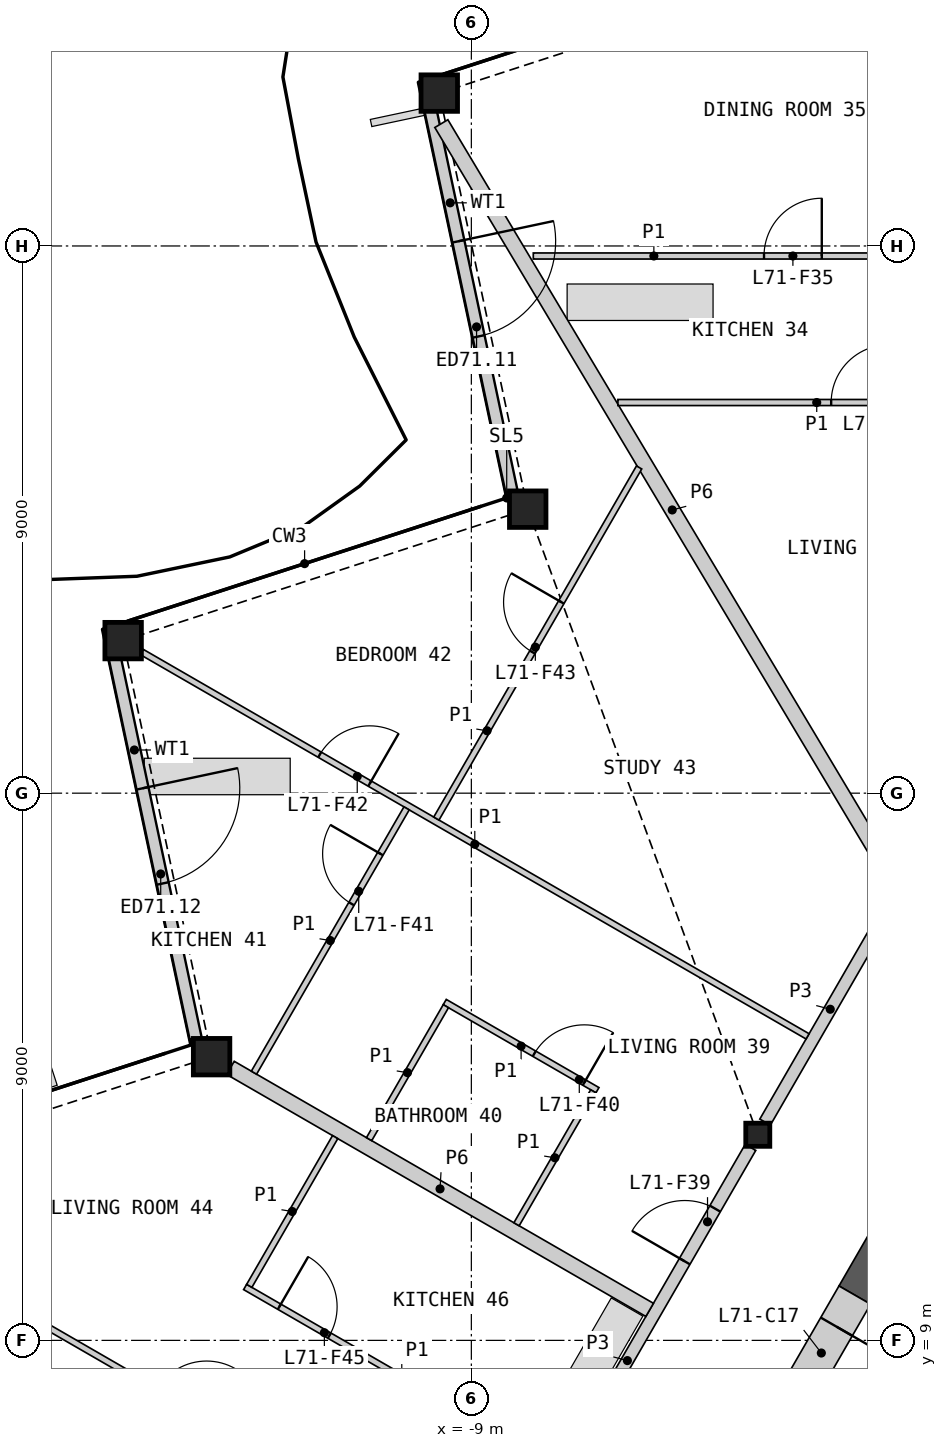
"""IFC4 building model, lengths in metres.
Left out: names, types, materials, properties, quantities, classifications, styles, units other than length and angle.
Written with IfcOpenShell. Run it as: python <this file> out.ifc"""

import sys

from ifc_helpers import new_model, si_unit, direction, frame, frame_2d, origin, origin_2d, place, context, subcontext, project, spatial, rectangle, hollow_rectangle, i_section, extrude, element, fill, save


model = new_model("IFC4")
c1 = context("Model", 3, precision=1e-05, world=origin(), true_north=direction((0.0, 1.0)))
c2 = subcontext(c1, "Body", "Model", "MODEL_VIEW")
j1 = project(units=[si_unit("LENGTHUNIT", "METRE"), si_unit("PLANEANGLEUNIT", "RADIAN")], contexts=[c1])
p1 = place(None, origin())
s1 = spatial("IfcSite", under=j1, at=p1, CompositionType="ELEMENT")
p2 = place(p1, origin())
s2 = spatial("IfcBuilding", under=s1, at=p2, CompositionType="ELEMENT")
p3 = place(p2, frame((0.0, 0.0, 322.2)))
s3 = spatial("IfcBuildingStorey", under=s2, at=p3, CompositionType="ELEMENT", Elevation=322.2)
for number, where, z_axis, x_axis in (
    (1, (-9.527, 29.514, 0.0), (0.0, 0.0, 1.0), (1.0, 0.0, 0.0)),
    (2, (-8.073, 22.671, 0.0), (0.0, 0.0, 1.0), (1.0, 0.0, 0.0)),
    (3, (-14.727, 20.509, 0.0), (0.0, 0.0, 1.0), (1.0, 0.0, 0.0)),
    (4, (-13.272, 13.666, 0.0), (0.0, 0.0, 1.0), (1.0, 0.0, 0.0)),
):
    element("IfcColumn", number, at=place(p3, frame(where, z_axis=z_axis, x_axis=x_axis)), inside=s3, PredefinedType="COLUMN", context=c2, shape_type="SweptSolid", body=[
        extrude(hollow_rectangle(XDim=0.6, YDim=0.6, WallThickness=0.04, at=origin_2d()), origin(), (0.0, 0.0, 1.0), 3.4),
    ])
p4 = place(p3, frame((-4.289, 12.382, 0.0), z_axis=(0.0, 0.0, 1.0), x_axis=(1.0, 0.0, 0.0)))
e5 = element("IfcColumn", 5, at=p4, inside=s3, PredefinedType="COLUMN", context=c2, shape_type="SweptSolid", body=[
    extrude(i_section(OverallWidth=0.396, OverallDepth=0.381, WebThickness=0.019, FlangeThickness=0.03, at=origin_2d()), origin(), (0.0, 0.0, 1.0), 3.4),
])
p5 = place(p3, frame((-9.684, 29.289, 0.0), z_axis=(0.0, 0.0, 1.0), x_axis=(0.207920686021, -0.978145688701, 0.0)))
e6 = element("IfcWall", 6, at=p5, inside=s3, PredefinedType="SOLIDWALL", context=c2, shape_type="SweptSolid", body=[
    extrude(rectangle(XDim=6.459, YDim=0.2, at=frame_2d((3.229, 0.0))), origin(), (0.0, 0.0, 1.0), 2.488),
])
p6 = place(p5, frame((2.261, 0.0, 0.0)))
e7 = element("IfcOpeningElement", 7, at=p6, cuts=e6, PredefinedType="OPENING", context=c2, shape_type="SweptSolid", body=[
    extrude(rectangle(XDim=1.6, YDim=2.25, at=frame_2d((0.8, 1.125))), frame((0.0, 0.11, 0.0), z_axis=(0.0, -1.0, 0.0), x_axis=(1.0, 0.0, 0.0)), (0.0, 0.0, 1.0), 0.22),
])
p7 = place(p3, frame((-14.878, 20.292, 0.0), z_axis=(0.0, 0.0, 1.0), x_axis=(0.207943189785, -0.978140904892, 0.0)))
e8 = element("IfcWall", 8, at=p7, inside=s3, PredefinedType="SOLIDWALL", context=c2, shape_type="SweptSolid", body=[
    extrude(rectangle(XDim=6.467, YDim=0.2, at=frame_2d((3.233, 0.0))), origin(), (0.0, 0.0, 1.0), 2.488),
])
p8 = place(p7, frame((2.261, 0.0, 0.0)))
e9 = element("IfcOpeningElement", 9, at=p8, cuts=e8, PredefinedType="OPENING", context=c2, shape_type="SweptSolid", body=[
    extrude(rectangle(XDim=1.6, YDim=2.25, at=frame_2d((0.8, 1.125))), frame((0.0, 0.11, 0.0), z_axis=(0.0, -1.0, 0.0), x_axis=(1.0, 0.0, 0.0)), (0.0, 0.0, 1.0), 0.22),
])
p9 = place(p3, frame((-0.26, 13.961, 0.0), z_axis=(0.0, 0.0, 1.0), x_axis=(-0.50000604952, -0.866021911064, 0.0)))
e10 = element("IfcWall", 10, at=p9, inside=s3, PredefinedType="SHEAR", context=c2, shape_type="SweptSolid", body=[
    extrude(rectangle(XDim=4.869, YDim=0.6, at=frame_2d((2.434, 0.0))), origin(), (0.0, 0.0, 1.0), 3.1),
])
p10 = place(p3, frame((-2.694, 9.745, 0.0), z_axis=(0.0, 0.0, 1.0), x_axis=(-0.50002983664, -0.866008176907, 0.0)))
e11 = element("IfcWall", 11, at=p10, inside=s3, PredefinedType="SHEAR", context=c2, shape_type="SweptSolid", body=[
    extrude(rectangle(XDim=2.2, YDim=0.6, at=frame_2d((1.1, 0.0))), origin(), (0.0, 0.0, 1.0), 3.1),
])
p11 = place(p10, frame((0.6, 0.0, 0.0)))
e12 = element("IfcOpeningElement", 12, at=p11, cuts=e11, PredefinedType="OPENING", context=c2, shape_type="SweptSolid", body=[
    extrude(rectangle(XDim=1.0, YDim=2.1, at=frame_2d((0.5, 1.05))), frame((0.0, 0.31, 0.0), z_axis=(0.0, -1.0, 0.0), x_axis=(1.0, 0.0, 0.0)), (0.0, 0.0, 1.0), 0.62),
])
p12 = place(p3, frame((-9.493, 29.012, 0.0), z_axis=(0.0, 0.0, 1.0), x_axis=(0.512967150926, -0.85840823742, 0.0)))
e13 = element("IfcWall", 13, at=p12, inside=s3, PredefinedType="PARTITIONING", context=c2, shape_type="SweptSolid", body=[
    extrude(rectangle(XDim=14.805, YDim=0.25, at=frame_2d((7.402, 0.0))), origin(), (0.0, 0.0, 1.0), 2.33),
])
p13 = place(p3, frame((-8.458, 5.16, 0.0), z_axis=(0.0, 0.0, 1.0), x_axis=(0.499984266882, 0.866034487114, 0.0)))
e14 = element("IfcWall", 14, at=p13, inside=s3, PredefinedType="PARTITIONING", context=c2, shape_type="SweptSolid", body=[
    extrude(rectangle(XDim=8.099, YDim=0.2, at=frame_2d((4.049, 0.0))), origin(), (0.0, 0.0, 1.0), 3.1),
])
p14 = place(p13, frame((5.935, 0.0, 0.0)))
e15 = element("IfcOpeningElement", 15, at=p14, cuts=e14, PredefinedType="OPENING", context=c2, shape_type="SweptSolid", body=[
    extrude(rectangle(XDim=1.0, YDim=2.1, at=frame_2d((0.5, 1.05))), frame((0.0, 0.11, 0.0), z_axis=(0.0, -1.0, 0.0), x_axis=(1.0, 0.0, 0.0)), (0.0, 0.0, 1.0), 0.22),
])
p15 = place(p13, frame((0.83, 0.0, 0.0)))
e16 = element("IfcOpeningElement", 16, at=p15, cuts=e14, PredefinedType="OPENING", context=c2, shape_type="SweptSolid", body=[
    extrude(rectangle(XDim=1.0, YDim=2.1, at=frame_2d((0.5, 1.05))), frame((0.0, 0.11, 0.0), z_axis=(0.0, -1.0, 0.0), x_axis=(1.0, 0.0, 0.0)), (0.0, 0.0, 1.0), 0.22),
])
p16 = place(p3, frame((-12.962, 13.482, 0.0), z_axis=(0.0, 0.0, 1.0), x_axis=(0.866022671543, -0.50000473235, 0.0)))
e17 = element("IfcWall", 17, at=p16, inside=s3, PredefinedType="PARTITIONING", context=c2, shape_type="SweptSolid", body=[
    extrude(rectangle(XDim=7.961, YDim=0.25, at=frame_2d((3.98, 0.0))), origin(), (0.0, 0.0, 1.0), 2.33),
])
p17 = place(p3, frame((-4.169, 12.59, 0.0), z_axis=(0.0, 0.0, 1.0), x_axis=(0.499978750566, 0.866037671803, 0.0)))
e18 = element("IfcWall", 18, at=p17, inside=s3, PredefinedType="PARTITIONING", context=c2, shape_type="SweptSolid", body=[
    extrude(rectangle(XDim=4.288, YDim=0.2, at=frame_2d((2.144, 0.0))), origin(), (0.0, 0.0, 1.0), 3.1),
])
p18 = place(p3, frame((-14.417, 20.32, 0.0), z_axis=(0.0, 0.0, 1.0), x_axis=(0.866021216079, -0.500007253249, 0.0)))
e19 = element("IfcWall", 19, at=p18, inside=s3, PredefinedType="PARTITIONING", context=c2, shape_type="SweptSolid", body=[
    extrude(rectangle(XDim=12.639, YDim=0.1, at=frame_2d((6.32, 0.0))), origin(), (0.0, 0.0, 1.0), 2.33),
])
p19 = place(p18, frame((3.375, 0.0, 0.0)))
e20 = element("IfcOpeningElement", 20, at=p19, cuts=e19, PredefinedType="OPENING", context=c2, shape_type="SweptSolid", body=[
    extrude(rectangle(XDim=0.95, YDim=2.1, at=frame_2d((0.475, 1.05))), frame((0.0, 0.06, 0.0), z_axis=(0.0, -1.0, 0.0), x_axis=(1.0, 0.0, 0.0)), (0.0, 0.0, 1.0), 0.12),
])
p20 = place(p3, frame((-19.615, 11.325, 0.0), z_axis=(0.0, 0.0, 1.0), x_axis=(0.86602139559, -0.500006942333, 0.0)))
e21 = element("IfcWall", 21, at=p20, inside=s3, PredefinedType="PARTITIONING", context=c2, shape_type="SweptSolid", body=[
    extrude(rectangle(XDim=12.505, YDim=0.1, at=frame_2d((6.252, 0.0))), origin(), (0.0, 0.0, 1.0), 2.33),
])
p21 = place(p20, frame((6.28, 0.0, 0.0)))
e22 = element("IfcOpeningElement", 22, at=p21, cuts=e21, PredefinedType="OPENING", context=c2, shape_type="SweptSolid", body=[
    extrude(rectangle(XDim=0.95, YDim=2.1, at=frame_2d((0.475, 1.05))), frame((0.0, 0.06, 0.0), z_axis=(0.0, -1.0, 0.0), x_axis=(1.0, 0.0, 0.0)), (0.0, 0.0, 1.0), 0.12),
])
p22 = place(p3, frame((-7.981, 26.835, 0.0), z_axis=(0.0, 0.0, 1.0), x_axis=(1.0, 0.0, 0.0)))
e23 = element("IfcWall", 23, at=p22, inside=s3, PredefinedType="PARTITIONING", context=c2, shape_type="SweptSolid", body=[
    extrude(rectangle(XDim=7.931, YDim=0.1, at=frame_2d((3.966, 0.0))), origin(), (0.0, 0.0, 1.0), 2.33),
])
p23 = place(p22, frame((3.794, 0.0, 0.0)))
e24 = element("IfcOpeningElement", 24, at=p23, cuts=e23, PredefinedType="OPENING", context=c2, shape_type="SweptSolid", body=[
    extrude(rectangle(XDim=0.95, YDim=2.1, at=frame_2d((0.475, 1.05))), frame((0.0, 0.06, 0.0), z_axis=(0.0, -1.0, 0.0), x_axis=(1.0, 0.0, 0.0)), (0.0, 0.0, 1.0), 0.12),
])
p24 = place(p3, frame((-9.575, 17.583, 0.0), z_axis=(0.0, 0.0, 1.0), x_axis=(0.499998189891, 0.866026448849, 0.0)))
e25 = element("IfcWall", 25, at=p24, inside=s3, PredefinedType="PARTITIONING", context=c2, shape_type="SweptSolid", body=[
    extrude(rectangle(XDim=6.668, YDim=0.1, at=frame_2d((3.334, 0.0))), origin(), (0.0, 0.0, 1.0), 2.33),
])
p25 = place(p24, frame((3.16, 0.0, 0.0)))
e26 = element("IfcOpeningElement", 26, at=p25, cuts=e25, PredefinedType="OPENING", context=c2, shape_type="SweptSolid", body=[
    extrude(rectangle(XDim=0.95, YDim=2.1, at=frame_2d((0.475, 1.05))), frame((0.0, 0.06, 0.0), z_axis=(0.0, -1.0, 0.0), x_axis=(1.0, 0.0, 0.0)), (0.0, 0.0, 1.0), 0.12),
])
p26 = place(p3, frame((-6.59, 24.425, 0.0), z_axis=(0.0, 0.0, 1.0), x_axis=(1.0, 0.0, 0.0)))
e27 = element("IfcWall", 27, at=p26, inside=s3, PredefinedType="PARTITIONING", context=c2, shape_type="SweptSolid", body=[
    extrude(rectangle(XDim=6.54, YDim=0.1, at=frame_2d((3.27, 0.0))), origin(), (0.0, 0.0, 1.0), 2.33),
])
p27 = place(p26, frame((3.508, 0.0, 0.0)))
e28 = element("IfcOpeningElement", 28, at=p27, cuts=e27, PredefinedType="OPENING", context=c2, shape_type="SweptSolid", body=[
    extrude(rectangle(XDim=0.95, YDim=2.1, at=frame_2d((0.475, 1.05))), frame((0.0, 0.06, 0.0), z_axis=(0.0, -1.0, 0.0), x_axis=(1.0, 0.0, 0.0)), (0.0, 0.0, 1.0), 0.12),
])
p28 = place(p3, frame((-12.721, 9.878, 0.0), z_axis=(0.0, 0.0, 1.0), x_axis=(0.866027751316, -0.499995933934, 0.0)))
e29 = element("IfcWall", 29, at=p28, inside=s3, PredefinedType="PARTITIONING", context=c2, shape_type="SweptSolid", body=[
    extrude(rectangle(XDim=5.95, YDim=0.1, at=frame_2d((2.975, 0.0))), origin(), (0.0, 0.0, 1.0), 2.33),
])
p29 = place(p28, frame((0.65, 0.0, 0.0)))
e30 = element("IfcOpeningElement", 30, at=p29, cuts=e29, PredefinedType="OPENING", context=c2, shape_type="SweptSolid", body=[
    extrude(rectangle(XDim=0.95, YDim=2.1, at=frame_2d((0.475, 1.05))), frame((0.0, 0.06, 0.0), z_axis=(0.0, -1.0, 0.0), x_axis=(1.0, 0.0, 0.0)), (0.0, 0.0, 1.0), 0.12),
])
p30 = place(p3, frame((-12.575, 13.403, 0.0), z_axis=(0.0, 0.0, 1.0), x_axis=(0.499989096993, 0.866031698547, 0.0)))
e31 = element("IfcWall", 31, at=p30, inside=s3, PredefinedType="PARTITIONING", context=c2, shape_type="SweptSolid", body=[
    extrude(rectangle(XDim=5.02, YDim=0.1, at=frame_2d((2.51, 0.0))), origin(), (0.0, 0.0, 1.0), 2.33),
])
p31 = place(p30, frame((3.208, 0.0, 0.0)))
e32 = element("IfcOpeningElement", 32, at=p31, cuts=e31, PredefinedType="OPENING", context=c2, shape_type="SweptSolid", body=[
    extrude(rectangle(XDim=0.95, YDim=2.1, at=frame_2d((0.475, 1.05))), frame((0.0, 0.06, 0.0), z_axis=(0.0, -1.0, 0.0), x_axis=(1.0, 0.0, 0.0)), (0.0, 0.0, 1.0), 0.12),
])
p32 = place(p3, frame((-12.652, 9.897, 0.0), z_axis=(0.0, 0.0, 1.0), x_axis=(0.500024172624, 0.866011447264, 0.0)))
e33 = element("IfcWall", 33, at=p32, inside=s3, PredefinedType="PARTITIONING", context=c2, shape_type="SweptSolid", body=[
    extrude(rectangle(XDim=2.825, YDim=0.1, at=frame_2d((1.413, 0.0))), origin(), (0.0, 0.0, 1.0), 2.33),
])
p33 = place(p3, frame((-9.438, 14.565, 0.0), z_axis=(0.0, 0.0, 1.0), x_axis=(0.866032775405, -0.499987231761, 0.0)))
e34 = element("IfcWall", 34, at=p33, inside=s3, PredefinedType="PARTITIONING", context=c2, shape_type="SweptSolid", body=[
    extrude(rectangle(XDim=2.9, YDim=0.1, at=frame_2d((1.45, 0.0))), origin(), (0.0, 0.0, 1.0), 2.33),
])
p34 = place(p33, frame((1.7, 0.0, 0.0)))
e35 = element("IfcOpeningElement", 35, at=p34, cuts=e34, PredefinedType="OPENING", context=c2, shape_type="SweptSolid", body=[
    extrude(rectangle(XDim=0.95, YDim=2.1, at=frame_2d((0.475, 1.05))), frame((0.0, 0.06, 0.0), z_axis=(0.0, -1.0, 0.0), x_axis=(1.0, 0.0, 0.0)), (0.0, 0.0, 1.0), 0.12),
])
for number, where, z_axis, x_axis in (
    (36, (-10.682, 12.31, 0.0), (0.0, 0.0, 1.0), (0.5, 0.866, 0.0)),
    (37, (-8.257, 10.91, 0.0), (0.0, 0.0, 1.0), (0.5, 0.866, 0.0)),
):
    element("IfcWall", number, at=place(p3, frame(where, z_axis=z_axis, x_axis=x_axis)), inside=s3, PredefinedType="PARTITIONING", context=c2, shape_type="SweptSolid", body=[
        extrude(rectangle(XDim=2.525, YDim=0.1, at=frame_2d((1.262, 0.0))), origin(), (0.0, 0.0, 1.0), 2.33),
    ])
p35 = place(p6, origin())
e38 = element("IfcDoor", 38, at=p35, inside=s3, OperationType="DOUBLE_DOOR_SINGLE_SWING", PredefinedType="DOOR", context=c2, shape_type="SweptSolid", body=[
    extrude(rectangle(XDim=1.6, YDim=2.25, at=frame_2d((0.8, 1.125))), frame((0.0, 0.025, 0.0), z_axis=(0.0, -1.0, 0.0), x_axis=(1.0, 0.0, 0.0)), (0.0, 0.0, 1.0), 0.05),
])
fill(e7, e38)
p36 = place(p8, origin())
e39 = element("IfcDoor", 39, at=p36, inside=s3, OperationType="DOUBLE_DOOR_SINGLE_SWING", PredefinedType="DOOR", context=c2, shape_type="SweptSolid", body=[
    extrude(rectangle(XDim=1.6, YDim=2.25, at=frame_2d((0.8, 1.125))), frame((0.0, 0.025, 0.0), z_axis=(0.0, -1.0, 0.0), x_axis=(1.0, 0.0, 0.0)), (0.0, 0.0, 1.0), 0.05),
])
fill(e9, e39)
p37 = place(p11, origin())
e40 = element("IfcDoor", 40, at=p37, inside=s3, OperationType="SINGLE_SWING_LEFT", PredefinedType="DOOR", context=c2, shape_type="SweptSolid", body=[
    extrude(rectangle(XDim=1.0, YDim=2.1, at=frame_2d((0.5, 1.05))), frame((0.0, 0.055, 0.0), z_axis=(0.0, -1.0, 0.0), x_axis=(1.0, 0.0, 0.0)), (0.0, 0.0, 1.0), 0.05),
])
fill(e12, e40)
p38 = place(p27, origin())
e41 = element("IfcDoor", 41, at=p38, inside=s3, OperationType="SINGLE_SWING_RIGHT", PredefinedType="DOOR", context=c2, shape_type="SweptSolid", body=[
    extrude(rectangle(XDim=0.95, YDim=2.1, at=frame_2d((0.475, 1.05))), frame((0.0, 0.025, 0.0), z_axis=(0.0, -1.0, 0.0), x_axis=(1.0, 0.0, 0.0)), (0.0, 0.0, 1.0), 0.05),
])
fill(e28, e41)
p39 = place(p23, origin())
e42 = element("IfcDoor", 42, at=p39, inside=s3, OperationType="SINGLE_SWING_RIGHT", PredefinedType="DOOR", context=c2, shape_type="SweptSolid", body=[
    extrude(rectangle(XDim=0.95, YDim=2.1, at=frame_2d((0.475, 1.05))), frame((0.0, 0.025, 0.0), z_axis=(0.0, -1.0, 0.0), x_axis=(1.0, 0.0, 0.0)), (0.0, 0.0, 1.0), 0.05),
])
fill(e24, e42)
p40 = place(p14, origin())
e43 = element("IfcDoor", 43, at=p40, inside=s3, OperationType="SINGLE_SWING_LEFT", PredefinedType="DOOR", context=c2, shape_type="SweptSolid", body=[
    extrude(rectangle(XDim=1.0, YDim=2.1, at=frame_2d((0.5, 1.05))), frame((0.0, 0.025, 0.0), z_axis=(0.0, -1.0, 0.0), x_axis=(1.0, 0.0, 0.0)), (0.0, 0.0, 1.0), 0.05),
])
fill(e15, e43)
p41 = place(p34, origin())
e44 = element("IfcDoor", 44, at=p41, inside=s3, OperationType="SINGLE_SWING_RIGHT", PredefinedType="DOOR", context=c2, shape_type="SweptSolid", body=[
    extrude(rectangle(XDim=0.95, YDim=2.1, at=frame_2d((0.475, 1.05))), frame((0.0, 0.025, 0.0), z_axis=(0.0, -1.0, 0.0), x_axis=(1.0, 0.0, 0.0)), (0.0, 0.0, 1.0), 0.05),
])
fill(e35, e44)
p42 = place(p31, origin())
e45 = element("IfcDoor", 45, at=p42, inside=s3, OperationType="SINGLE_SWING_RIGHT", PredefinedType="DOOR", context=c2, shape_type="SweptSolid", body=[
    extrude(rectangle(XDim=0.95, YDim=2.1, at=frame_2d((0.475, 1.05))), frame((0.0, 0.025, 0.0), z_axis=(0.0, -1.0, 0.0), x_axis=(1.0, 0.0, 0.0)), (0.0, 0.0, 1.0), 0.05),
])
fill(e32, e45)
p43 = place(p19, origin())
e46 = element("IfcDoor", 46, at=p43, inside=s3, OperationType="SINGLE_SWING_RIGHT", PredefinedType="DOOR", context=c2, shape_type="SweptSolid", body=[
    extrude(rectangle(XDim=0.95, YDim=2.1, at=frame_2d((0.475, 1.05))), frame((0.0, 0.025, 0.0), z_axis=(0.0, -1.0, 0.0), x_axis=(1.0, 0.0, 0.0)), (0.0, 0.0, 1.0), 0.05),
])
fill(e20, e46)
p44 = place(p25, origin())
e47 = element("IfcDoor", 47, at=p44, inside=s3, OperationType="SINGLE_SWING_RIGHT", PredefinedType="DOOR", context=c2, shape_type="SweptSolid", body=[
    extrude(rectangle(XDim=0.95, YDim=2.1, at=frame_2d((0.475, 1.05))), frame((0.0, 0.025, 0.0), z_axis=(0.0, -1.0, 0.0), x_axis=(1.0, 0.0, 0.0)), (0.0, 0.0, 1.0), 0.05),
])
fill(e26, e47)
p45 = place(p29, origin())
e48 = element("IfcDoor", 48, at=p45, inside=s3, OperationType="SINGLE_SWING_LEFT", PredefinedType="DOOR", context=c2, shape_type="SweptSolid", body=[
    extrude(rectangle(XDim=0.95, YDim=2.1, at=frame_2d((0.475, 1.05))), frame((0.0, 0.025, 0.0), z_axis=(0.0, -1.0, 0.0), x_axis=(1.0, 0.0, 0.0)), (0.0, 0.0, 1.0), 0.05),
])
fill(e30, e48)
save(model, sys.argv[1])
